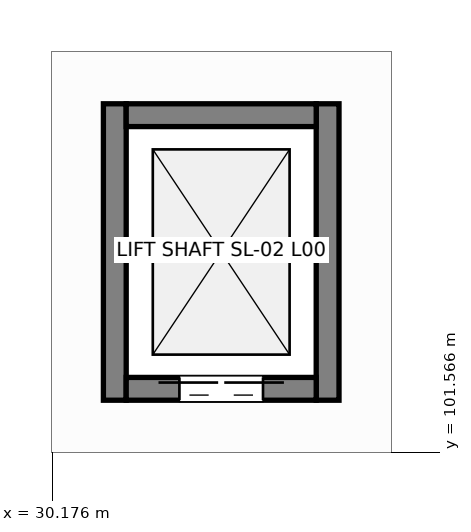
"""IFC4 building model, lengths in metres.
Left out: names, types, materials, properties, quantities, classifications, styles, units other than length and angle.
Written with IfcOpenShell. Run it as: python <this file> out.ifc"""

import sys

from ifc_helpers import new_model, si_unit, direction, frame, frame_2d, origin, place, context, subcontext, project, spatial, rectangle, extrude, element, fill, save


model = new_model("IFC4")
c1 = context("Model", 3, precision=1e-05, world=origin(), true_north=direction((0.0, 1.0)))
c2 = subcontext(c1, "Body", "Model", "MODEL_VIEW")
j1 = project(units=[si_unit("LENGTHUNIT", "METRE"), si_unit("PLANEANGLEUNIT", "RADIAN")], contexts=[c1])
p1 = place(None, origin())
s1 = spatial("IfcSite", under=j1, at=p1, CompositionType="ELEMENT")
p2 = place(p1, origin())
s2 = spatial("IfcBuilding", under=s1, at=p2, CompositionType="ELEMENT")
p3 = place(p2, origin())
s3 = spatial("IfcBuildingStorey", under=s2, at=p3, CompositionType="ELEMENT", Elevation=0.0)
for number, where, z_axis, x_axis in (
    (1, (31.0, 102.25, 0.0), (0.0, 0.0, 1.0), (0.0, 1.0, 0.0)),
    (2, (33.8, 102.25, 0.0), (0.0, 0.0, 1.0), (0.0, 1.0, 0.0)),
):
    element("IfcWall", number, at=place(p3, frame(where, z_axis=z_axis, x_axis=x_axis)), inside=s3, PredefinedType="SHEAR", context=c2, shape_type="SweptSolid", body=[
        extrude(rectangle(XDim=3.9, YDim=0.3, at=frame_2d((1.95, 0.0))), origin(), (0.0, 0.0, 1.0), 4.58),
    ])
p4 = place(p3, frame((31.15, 106.0, 0.0), z_axis=(0.0, 0.0, 1.0), x_axis=(1.0, 0.0, 0.0)))
e3 = element("IfcWall", 3, at=p4, inside=s3, PredefinedType="SHEAR", context=c2, shape_type="SweptSolid", body=[
    extrude(rectangle(XDim=2.5, YDim=0.3, at=frame_2d((1.25, 0.0))), origin(), (0.0, 0.0, 1.0), 4.58),
])
p5 = place(p3, frame((31.15, 102.4, 0.0), z_axis=(0.0, 0.0, 1.0), x_axis=(1.0, 0.0, 0.0)))
e4 = element("IfcWall", 4, at=p5, inside=s3, PredefinedType="SHEAR", context=c2, shape_type="SweptSolid", body=[
    extrude(rectangle(XDim=2.5, YDim=0.3, at=frame_2d((1.25, 0.0))), origin(), (0.0, 0.0, 1.0), 4.58),
])
p6 = place(p5, frame((0.7, 0.0, 0.0)))
e5 = element("IfcOpeningElement", 5, at=p6, cuts=e4, PredefinedType="OPENING", context=c2, shape_type="SweptSolid", body=[
    extrude(rectangle(XDim=1.1, YDim=2.15, at=frame_2d((0.55, 1.075))), frame((0.0, 0.16, 0.0), z_axis=(0.0, -1.0, 0.0), x_axis=(1.0, 0.0, 0.0)), (0.0, 0.0, 1.0), 0.32),
])
p7 = place(p6, origin())
e6 = element("IfcDoor", 6, at=p7, inside=s3, OperationType="DOUBLE_DOOR_SLIDING", PredefinedType="DOOR", context=c2, shape_type="SweptSolid", body=[
    extrude(rectangle(XDim=1.1, YDim=2.15, at=frame_2d((0.55, 1.075))), frame((0.0, 0.025, 0.0), z_axis=(0.0, -1.0, 0.0), x_axis=(1.0, 0.0, 0.0)), (0.0, 0.0, 1.0), 0.05),
])
fill(e5, e6)
save(model, sys.argv[1])
